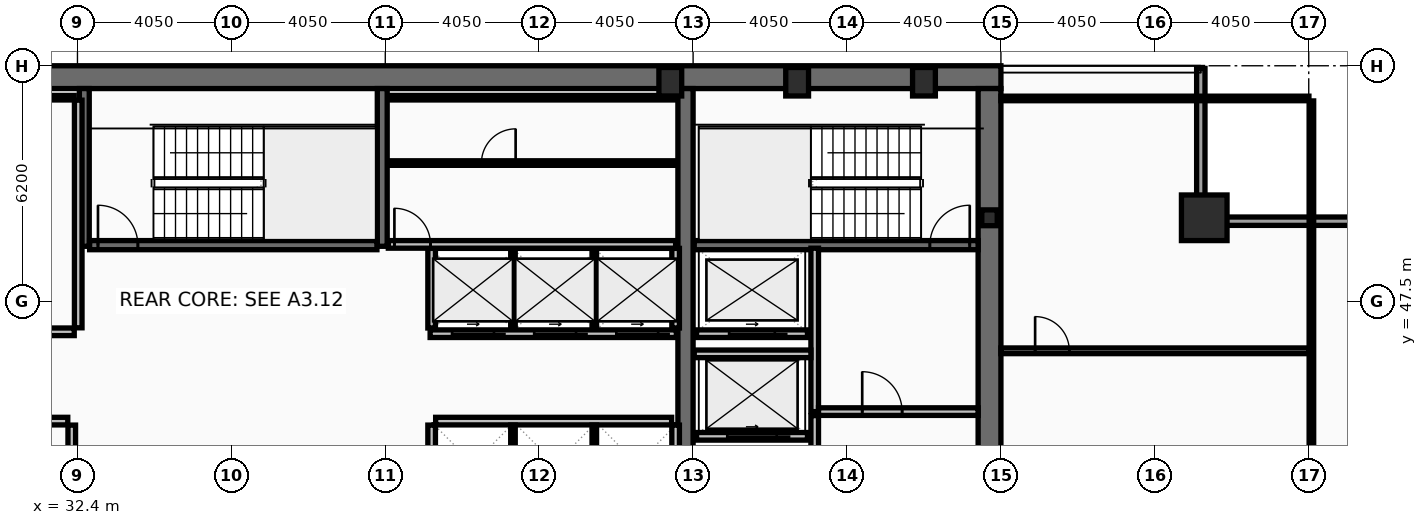
"""IFC4 building model, lengths in metres.
Left out: names, types, materials, properties, quantities, classifications, styles, units other than length and angle.
Written with IfcOpenShell. Run it as: python <this file> out.ifc"""

import sys

from ifc_helpers import new_model, si_unit, direction, frame, frame_2d, origin, origin_2d, place, context, subcontext, project, spatial, rectangle, hollow_rectangle, i_section, extrude, element, fill, save


model = new_model("IFC4")
c1 = context("Model", 3, precision=1e-05, world=origin(), true_north=direction((0.0, 1.0)))
c2 = subcontext(c1, "Body", "Model", "MODEL_VIEW")
j1 = project(units=[si_unit("LENGTHUNIT", "METRE"), si_unit("PLANEANGLEUNIT", "RADIAN")], contexts=[c1])
p1 = place(None, origin())
s1 = spatial("IfcSite", under=j1, at=p1, CompositionType="ELEMENT")
p2 = place(p1, origin())
s2 = spatial("IfcBuilding", under=s1, at=p2, CompositionType="ELEMENT")
p3 = place(p2, frame((0.0, 0.0, 235.4)))
s3 = spatial("IfcBuildingStorey", under=s2, at=p3, CompositionType="ELEMENT", Elevation=235.4)
p4 = place(p3, frame((16.2, 53.4, 0.0), z_axis=(0.0, 0.0, 1.0), x_axis=(1.0, 0.0, 0.0)))
e1 = element("IfcWall", 1, at=p4, inside=s3, PredefinedType="SHEAR", context=c2, shape_type="SweptSolid", body=[
    extrude(rectangle(XDim=40.5, YDim=0.6, at=frame_2d((20.25, 0.0))), origin(), (0.0, 0.0, 1.0), 3.44),
])
p5 = place(p3, frame((56.4, 53.1, 0.0), z_axis=(0.0, 0.0, 1.0), x_axis=(0.0, -1.0, 0.0)))
e2 = element("IfcWall", 2, at=p5, inside=s3, PredefinedType="SHEAR", context=c2, shape_type="SweptSolid", body=[
    extrude(rectangle(XDim=11.2, YDim=0.6, at=frame_2d((5.6, 0.0))), origin(), (0.0, 0.0, 1.0), 3.44),
])
p6 = place(p3, frame((48.4, 41.9, 0.0), z_axis=(0.0, 0.0, 1.0), x_axis=(0.0, 1.0, 0.0)))
e3 = element("IfcWall", 3, at=p6, inside=s3, PredefinedType="SHEAR", context=c2, shape_type="SweptSolid", body=[
    extrude(rectangle(XDim=11.2, YDim=0.4, at=frame_2d((5.6, 0.0))), origin(), (0.0, 0.0, 1.0), 3.44),
])
for number, where, z_axis, x_axis in (
    (4, (32.58, 48.95, 0.0), (0.0, 0.0, 1.0), (0.0, 1.0, 0.0)),
    (5, (40.42, 48.95, 0.0), (0.0, 0.0, 1.0), (0.0, 1.0, 0.0)),
):
    element("IfcWall", number, at=place(p3, frame(where, z_axis=z_axis, x_axis=x_axis)), inside=s3, PredefinedType="SHEAR", context=c2, shape_type="SweptSolid", body=[
        extrude(rectangle(XDim=4.15, YDim=0.26, at=frame_2d((2.075, 0.0))), origin(), (0.0, 0.0, 1.0), 3.44),
    ])
p7 = place(p3, frame((48.63, 48.98, 0.0), z_axis=(0.0, 0.0, 1.0), x_axis=(1.0, 0.0, 0.0)))
e6 = element("IfcWall", 6, at=p7, inside=s3, PredefinedType="SHEAR", context=c2, shape_type="SweptSolid", body=[
    extrude(rectangle(XDim=7.47, YDim=0.24, at=frame_2d((3.735, 0.0))), origin(), (0.0, 0.0, 1.0), 3.44),
])
p8 = place(p7, frame((6.2, 0.0, 0.0)))
e7 = element("IfcOpeningElement", 7, at=p8, cuts=e6, PredefinedType="OPENING", context=c2, shape_type="SweptSolid", body=[
    extrude(rectangle(XDim=1.05, YDim=2.15, at=frame_2d((0.525, 1.075))), frame((0.0, 0.13, 0.0), z_axis=(0.0, -1.0, 0.0), x_axis=(1.0, 0.0, 0.0)), (0.0, 0.0, 1.0), 0.26),
])
p9 = place(p3, frame((32.72, 48.98, 0.0), z_axis=(0.0, 0.0, 1.0), x_axis=(1.0, 0.0, 0.0)))
e8 = element("IfcWall", 8, at=p9, inside=s3, PredefinedType="SHEAR", context=c2, shape_type="SweptSolid", body=[
    extrude(rectangle(XDim=7.56, YDim=0.24, at=frame_2d((3.78, 0.0))), origin(), (0.0, 0.0, 1.0), 3.44),
])
p10 = place(p9, frame((0.22, 0.0, 0.0)))
e9 = element("IfcOpeningElement", 9, at=p10, cuts=e8, PredefinedType="OPENING", context=c2, shape_type="SweptSolid", body=[
    extrude(rectangle(XDim=1.05, YDim=2.15, at=frame_2d((0.525, 1.075))), frame((0.0, 0.13, 0.0), z_axis=(0.0, -1.0, 0.0), x_axis=(1.0, 0.0, 0.0)), (0.0, 0.0, 1.0), 0.26),
])
p11 = place(p3, frame((62.05, 49.7, 0.0), z_axis=(0.0, 0.0, 1.0), x_axis=(1.0, 0.0, 0.0)))
e10 = element("IfcColumn", 10, at=p11, inside=s3, PredefinedType="COLUMN", context=c2, shape_type="SweptSolid", body=[
    extrude(hollow_rectangle(XDim=1.2, YDim=1.2, WallThickness=0.06, at=origin_2d()), origin(), (0.0, 0.0, 1.0), 3.6),
])
for number, where, z_axis, x_axis in (
    (11, (48.0, 53.28, 0.0), (0.0, 0.0, 1.0), (1.0, 0.0, 0.0)),
    (12, (51.337, 53.28, 0.0), (0.0, 0.0, 1.0), (1.0, 0.0, 0.0)),
    (13, (54.675, 53.28, 0.0), (0.0, 0.0, 1.0), (1.0, 0.0, 0.0)),
):
    element("IfcColumn", number, at=place(p3, frame(where, z_axis=z_axis, x_axis=x_axis)), inside=s3, PredefinedType="COLUMN", context=c2, shape_type="SweptSolid", body=[
        extrude(hollow_rectangle(XDim=0.6, YDim=0.75, WallThickness=0.045, at=origin_2d()), origin(), (0.0, 0.0, 1.0), 3.6),
    ])
p12 = place(p3, frame((56.4, 49.7, 0.0), z_axis=(0.0, 0.0, 1.0), x_axis=(1.0, 0.0, 0.0)))
e14 = element("IfcColumn", 14, at=p12, inside=s3, PredefinedType="COLUMN", context=c2, shape_type="SweptSolid", body=[
    extrude(i_section(OverallWidth=0.406, OverallDepth=0.416, WebThickness=0.03, FlangeThickness=0.048, at=origin_2d()), origin(), (0.0, 0.0, 1.0), 3.6),
])
p13 = place(p3, frame((61.96, 53.63, 0.0), z_axis=(0.0, 0.0, 1.0), x_axis=(0.0, -1.0, 0.0)))
e15 = element("IfcWall", 15, at=p13, inside=s3, PredefinedType="SOLIDWALL", context=c2, shape_type="SweptSolid", body=[
    extrude(rectangle(XDim=3.91, YDim=0.22, at=frame_2d((1.955, 0.0))), origin(), (0.0, 0.0, 1.0), 2.09),
])
p14 = place(p3, frame((61.85, 49.61, 0.0), z_axis=(0.0, 0.0, 1.0), x_axis=(1.0, 0.0, 0.0)))
e16 = element("IfcWall", 16, at=p14, inside=s3, PredefinedType="SOLIDWALL", context=c2, shape_type="SweptSolid", body=[
    extrude(rectangle(XDim=4.13, YDim=0.22, at=frame_2d((2.065, 0.0))), origin(), (0.0, 0.0, 1.0), 2.09),
])
p15 = place(p3, frame((51.61, 43.95, 0.0), z_axis=(0.0, 0.0, 1.0), x_axis=(-1.0, 0.0, 0.0)))
e17 = element("IfcWall", 17, at=p15, inside=s3, PredefinedType="PARTITIONING", context=c2, shape_type="SweptSolid", body=[
    extrude(rectangle(XDim=2.92, YDim=0.2, at=frame_2d((1.46, 0.0))), origin(), (0.0, 0.0, 1.0), 3.44),
])
p16 = place(p15, frame((0.81, 0.0, 0.0)))
e18 = element("IfcOpeningElement", 18, at=p16, cuts=e17, PredefinedType="OPENING", context=c2, shape_type="SweptSolid", body=[
    extrude(rectangle(XDim=1.3, YDim=2.18, at=frame_2d((0.65, 1.09))), frame((0.0, 0.11, 0.0), z_axis=(0.0, -1.0, 0.0), x_axis=(1.0, 0.0, 0.0)), (0.0, 0.0, 1.0), 0.22),
])
p17 = place(p3, frame((51.61, 46.65, 0.0), z_axis=(0.0, 0.0, 1.0), x_axis=(-1.0, 0.0, 0.0)))
e19 = element("IfcWall", 19, at=p17, inside=s3, PredefinedType="PARTITIONING", context=c2, shape_type="SweptSolid", body=[
    extrude(rectangle(XDim=2.92, YDim=0.2, at=frame_2d((1.46, 0.0))), origin(), (0.0, 0.0, 1.0), 3.44),
])
p18 = place(p17, frame((0.86, 0.0, 0.0)))
e20 = element("IfcOpeningElement", 20, at=p18, cuts=e19, PredefinedType="OPENING", context=c2, shape_type="SweptSolid", body=[
    extrude(rectangle(XDim=1.2, YDim=2.18, at=frame_2d((0.6, 1.09))), frame((0.0, 0.11, 0.0), z_axis=(0.0, -1.0, 0.0), x_axis=(1.0, 0.0, 0.0)), (0.0, 0.0, 1.0), 0.22),
])
p19 = place(p3, frame((48.16, 46.65, 0.0), z_axis=(0.0, 0.0, 1.0), x_axis=(-1.0, 0.0, 0.0)))
e21 = element("IfcWall", 21, at=p19, inside=s3, PredefinedType="PARTITIONING", context=c2, shape_type="SweptSolid", body=[
    extrude(rectangle(XDim=6.48, YDim=0.2, at=frame_2d((3.24, 0.0))), origin(), (0.0, 0.0, 1.0), 3.44),
])
p20 = place(p19, frame((4.8, 0.0, 0.0)))
e22 = element("IfcOpeningElement", 22, at=p20, cuts=e21, PredefinedType="OPENING", context=c2, shape_type="SweptSolid", body=[
    extrude(rectangle(XDim=1.1, YDim=2.18, at=frame_2d((0.55, 1.09))), frame((0.0, 0.11, 0.0), z_axis=(0.0, -1.0, 0.0), x_axis=(1.0, 0.0, 0.0)), (0.0, 0.0, 1.0), 0.22),
])
p21 = place(p19, frame((2.64, 0.0, 0.0)))
e23 = element("IfcOpeningElement", 23, at=p21, cuts=e21, PredefinedType="OPENING", context=c2, shape_type="SweptSolid", body=[
    extrude(rectangle(XDim=1.1, YDim=2.18, at=frame_2d((0.55, 1.09))), frame((0.0, 0.11, 0.0), z_axis=(0.0, -1.0, 0.0), x_axis=(1.0, 0.0, 0.0)), (0.0, 0.0, 1.0), 0.22),
])
p22 = place(p19, frame((0.48, 0.0, 0.0)))
e24 = element("IfcOpeningElement", 24, at=p22, cuts=e21, PredefinedType="OPENING", context=c2, shape_type="SweptSolid", body=[
    extrude(rectangle(XDim=1.1, YDim=2.18, at=frame_2d((0.55, 1.09))), frame((0.0, 0.11, 0.0), z_axis=(0.0, -1.0, 0.0), x_axis=(1.0, 0.0, 0.0)), (0.0, 0.0, 1.0), 0.22),
])
p23 = place(p3, frame((51.8, 44.6, 0.0), z_axis=(0.0, 0.0, 1.0), x_axis=(0.0, 1.0, 0.0)))
e25 = element("IfcWall", 25, at=p23, inside=s3, PredefinedType="PARTITIONING", context=c2, shape_type="SweptSolid", body=[
    extrude(rectangle(XDim=4.3, YDim=0.2, at=frame_2d((2.15, 0.0))), origin(), (0.0, 0.0, 1.0), 3.44),
])
p24 = place(p3, frame((51.9, 44.6, 0.0), z_axis=(0.0, 0.0, 1.0), x_axis=(1.0, 0.0, 0.0)))
e26 = element("IfcWall", 26, at=p24, inside=s3, PredefinedType="PARTITIONING", context=c2, shape_type="SweptSolid", body=[
    extrude(rectangle(XDim=4.2, YDim=0.2, at=frame_2d((2.1, 0.0))), origin(), (0.0, 0.0, 1.0), 3.44),
])
p25 = place(p24, frame((1.15, 0.0, 0.0)))
e27 = element("IfcOpeningElement", 27, at=p25, cuts=e26, PredefinedType="OPENING", context=c2, shape_type="SweptSolid", body=[
    extrude(rectangle(XDim=1.05, YDim=2.15, at=frame_2d((0.525, 1.075))), frame((0.0, 0.11, 0.0), z_axis=(0.0, -1.0, 0.0), x_axis=(1.0, 0.0, 0.0)), (0.0, 0.0, 1.0), 0.22),
])
p26 = place(p3, frame((48.63, 46.12, 0.0), z_axis=(0.0, 0.0, 1.0), x_axis=(1.0, 0.0, 0.0)))
e28 = element("IfcWall", 28, at=p26, inside=s3, PredefinedType="PARTITIONING", context=c2, shape_type="SweptSolid", body=[
    extrude(rectangle(XDim=3.07, YDim=0.2, at=frame_2d((1.535, 0.0))), origin(), (0.0, 0.0, 1.0), 3.44),
])
p27 = place(p3, frame((51.8, 41.9, 0.0), z_axis=(0.0, 0.0, 1.0), x_axis=(0.0, 1.0, 0.0)))
e29 = element("IfcWall", 29, at=p27, inside=s3, PredefinedType="PARTITIONING", context=c2, shape_type="SweptSolid", body=[
    extrude(rectangle(XDim=2.595, YDim=0.2, at=frame_2d((1.298, 0.0))), origin(), (0.0, 0.0, 1.0), 3.44),
])
p28 = place(p27, frame((0.38, 0.0, 0.0)))
e30 = element("IfcOpeningElement", 30, at=p28, cuts=e29, PredefinedType="OPENING", context=c2, shape_type="SweptSolid", body=[
    extrude(rectangle(XDim=1.05, YDim=2.15, at=frame_2d((0.525, 1.075))), frame((0.0, 0.11, 0.0), z_axis=(0.0, -1.0, 0.0), x_axis=(1.0, 0.0, 0.0)), (0.0, 0.0, 1.0), 0.22),
])
p29 = place(p3, frame((32.42, 46.805, 0.0), z_axis=(0.0, 0.0, 1.0), x_axis=(0.0, 1.0, 0.0)))
e31 = element("IfcWall", 31, at=p29, inside=s3, PredefinedType="PARTITIONING", context=c2, shape_type="SweptSolid", body=[
    extrude(rectangle(XDim=5.99, YDim=0.2, at=frame_2d((2.995, 0.0))), origin(), (0.0, 0.0, 1.0), 3.44),
])
p30 = place(p3, frame((24.805, 52.86, 0.0), z_axis=(0.0, 0.0, 1.0), x_axis=(1.0, 0.0, 0.0)))
e32 = element("IfcWall", 32, at=p30, inside=s3, PredefinedType="PARTITIONING", context=c2, shape_type="SweptSolid", body=[
    extrude(rectangle(XDim=7.51, YDim=0.12, at=frame_2d((3.755, 0.0))), origin(), (0.0, 0.0, 1.0), 3.44),
])
p31 = place(p3, frame((24.805, 46.7, 0.0), z_axis=(0.0, 0.0, 1.0), x_axis=(1.0, 0.0, 0.0)))
e33 = element("IfcWall", 33, at=p31, inside=s3, PredefinedType="PARTITIONING", context=c2, shape_type="SweptSolid", body=[
    extrude(rectangle(XDim=7.51, YDim=0.2, at=frame_2d((3.755, 0.0))), origin(), (0.0, 0.0, 1.0), 3.44),
])
p32 = place(p31, frame((1.15, 0.0, 0.0)))
e34 = element("IfcOpeningElement", 34, at=p32, cuts=e33, PredefinedType="OPENING", context=c2, shape_type="SweptSolid", body=[
    extrude(rectangle(XDim=0.95, YDim=2.1, at=frame_2d((0.475, 1.05))), frame((0.0, 0.11, 0.0), z_axis=(0.0, -1.0, 0.0), x_axis=(1.0, 0.0, 0.0)), (0.0, 0.0, 1.0), 0.22),
])
p33 = place(p31, frame((5.336, 0.0, 0.0)))
e35 = element("IfcOpeningElement", 35, at=p33, cuts=e33, PredefinedType="OPENING", context=c2, shape_type="SweptSolid", body=[
    extrude(rectangle(XDim=0.95, YDim=2.1, at=frame_2d((0.475, 1.05))), frame((0.0, 0.11, 0.0), z_axis=(0.0, -1.0, 0.0), x_axis=(1.0, 0.0, 0.0)), (0.0, 0.0, 1.0), 0.22),
])
p34 = place(p3, frame((32.25, 41.95, 0.0), z_axis=(0.0, 0.0, 1.0), x_axis=(0.0, 1.0, 0.0)))
e36 = element("IfcWall", 36, at=p34, inside=s3, PredefinedType="PARTITIONING", context=c2, shape_type="SweptSolid", body=[
    extrude(rectangle(XDim=2.295, YDim=0.2, at=frame_2d((1.147, 0.0))), origin(), (0.0, 0.0, 1.0), 3.44),
])
p35 = place(p3, frame((24.805, 44.35, 0.0), z_axis=(0.0, 0.0, 1.0), x_axis=(1.0, 0.0, 0.0)))
e37 = element("IfcWall", 37, at=p35, inside=s3, PredefinedType="PARTITIONING", context=c2, shape_type="SweptSolid", body=[
    extrude(rectangle(XDim=7.34, YDim=0.2, at=frame_2d((3.67, 0.0))), origin(), (0.0, 0.0, 1.0), 3.44),
])
p36 = place(p35, frame((1.15, 0.0, 0.0)))
e38 = element("IfcOpeningElement", 38, at=p36, cuts=e37, PredefinedType="OPENING", context=c2, shape_type="SweptSolid", body=[
    extrude(rectangle(XDim=0.95, YDim=2.1, at=frame_2d((0.475, 1.05))), frame((0.0, 0.11, 0.0), z_axis=(0.0, -1.0, 0.0), x_axis=(1.0, 0.0, 0.0)), (0.0, 0.0, 1.0), 0.22),
])
p37 = place(p35, frame((5.231, 0.0, 0.0)))
e39 = element("IfcOpeningElement", 39, at=p37, cuts=e37, PredefinedType="OPENING", context=c2, shape_type="SweptSolid", body=[
    extrude(rectangle(XDim=0.95, YDim=2.1, at=frame_2d((0.475, 1.05))), frame((0.0, 0.11, 0.0), z_axis=(0.0, -1.0, 0.0), x_axis=(1.0, 0.0, 0.0)), (0.0, 0.0, 1.0), 0.22),
])
for number, where, z_axis, x_axis in (
    (40, (41.72, 46.8, 0.0), (0.0, 0.0, 1.0), (0.0, 1.0, 0.0)),
    (41, (48.14, 46.8, 0.0), (0.0, 0.0, 1.0), (0.0, 1.0, 0.0)),
):
    element("IfcWall", number, at=place(p3, frame(where, z_axis=z_axis, x_axis=x_axis)), inside=s3, PredefinedType="PARTITIONING", context=c2, shape_type="SweptSolid", body=[
        extrude(rectangle(XDim=2.095, YDim=0.2, at=frame_2d((1.047, 0.0))), origin(), (0.0, 0.0, 1.0), 3.44),
    ])
for number, where, z_axis, x_axis in (
    (42, (43.86, 46.8, 0.0), (0.0, 0.0, 1.0), (0.0, 1.0, 0.0)),
    (43, (46.0, 46.8, 0.0), (0.0, 0.0, 1.0), (0.0, 1.0, 0.0)),
):
    element("IfcWall", number, at=place(p3, frame(where, z_axis=z_axis, x_axis=x_axis)), inside=s3, PredefinedType="PARTITIONING", context=c2, shape_type="SweptSolid", body=[
        extrude(rectangle(XDim=2.095, YDim=0.12, at=frame_2d((1.047, 0.0))), origin(), (0.0, 0.0, 1.0), 3.44),
    ])
p38 = place(p3, frame((41.825, 44.35, 0.0), z_axis=(0.0, 0.0, 1.0), x_axis=(1.0, 0.0, 0.0)))
e44 = element("IfcWall", 44, at=p38, inside=s3, PredefinedType="PARTITIONING", context=c2, shape_type="SweptSolid", body=[
    extrude(rectangle(XDim=6.21, YDim=0.2, at=frame_2d((3.105, 0.0))), origin(), (0.0, 0.0, 1.0), 3.44),
])
for number, where, z_axis, x_axis in (
    (45, (41.72, 41.95, 0.0), (0.0, 0.0, 1.0), (0.0, 1.0, 0.0)),
    (46, (48.14, 41.95, 0.0), (0.0, 0.0, 1.0), (0.0, 1.0, 0.0)),
):
    element("IfcWall", number, at=place(p3, frame(where, z_axis=z_axis, x_axis=x_axis)), inside=s3, PredefinedType="PARTITIONING", context=c2, shape_type="SweptSolid", body=[
        extrude(rectangle(XDim=2.295, YDim=0.2, at=frame_2d((1.147, 0.0))), origin(), (0.0, 0.0, 1.0), 3.44),
    ])
for number, where, z_axis, x_axis in (
    (47, (43.86, 41.95, 0.0), (0.0, 0.0, 1.0), (0.0, 1.0, 0.0)),
    (48, (46.0, 41.95, 0.0), (0.0, 0.0, 1.0), (0.0, 1.0, 0.0)),
):
    element("IfcWall", number, at=place(p3, frame(where, z_axis=z_axis, x_axis=x_axis)), inside=s3, PredefinedType="PARTITIONING", context=c2, shape_type="SweptSolid", body=[
        extrude(rectangle(XDim=2.295, YDim=0.12, at=frame_2d((1.147, 0.0))), origin(), (0.0, 0.0, 1.0), 3.44),
    ])
p39 = place(p3, frame((40.58, 52.86, 0.0), z_axis=(0.0, 0.0, 1.0), x_axis=(1.0, 0.0, 0.0)))
e49 = element("IfcWall", 49, at=p39, inside=s3, PredefinedType="PARTITIONING", context=c2, shape_type="SweptSolid", body=[
    extrude(rectangle(XDim=7.56, YDim=0.12, at=frame_2d((3.78, 0.0))), origin(), (0.0, 0.0, 1.0), 3.44),
])
p40 = place(p3, frame((40.58, 49.0, 0.0), z_axis=(0.0, 0.0, 1.0), x_axis=(1.0, 0.0, 0.0)))
e50 = element("IfcWall", 50, at=p40, inside=s3, PredefinedType="PARTITIONING", context=c2, shape_type="SweptSolid", body=[
    extrude(rectangle(XDim=7.56, YDim=0.2, at=frame_2d((3.78, 0.0))), origin(), (0.0, 0.0, 1.0), 3.44),
])
p41 = place(p40, frame((0.16, 0.0, 0.0)))
e51 = element("IfcOpeningElement", 51, at=p41, cuts=e50, PredefinedType="OPENING", context=c2, shape_type="SweptSolid", body=[
    extrude(rectangle(XDim=0.95, YDim=2.1, at=frame_2d((0.475, 1.05))), frame((0.0, 0.11, 0.0), z_axis=(0.0, -1.0, 0.0), x_axis=(1.0, 0.0, 0.0)), (0.0, 0.0, 1.0), 0.22),
])
p42 = place(p3, frame((40.63, 51.14, 0.0), z_axis=(0.0, 0.0, 1.0), x_axis=(1.0, 0.0, 0.0)))
e52 = element("IfcWall", 52, at=p42, inside=s3, PredefinedType="PARTITIONING", context=c2, shape_type="SweptSolid", body=[
    extrude(rectangle(XDim=7.46, YDim=0.12, at=frame_2d((3.73, 0.0))), origin(), (0.0, 0.0, 1.0), 3.44),
])
p43 = place(p42, frame((2.4, 0.0, 0.0)))
e53 = element("IfcOpeningElement", 53, at=p43, cuts=e52, PredefinedType="OPENING", context=c2, shape_type="SweptSolid", body=[
    extrude(rectangle(XDim=0.9, YDim=2.05, at=frame_2d((0.45, 1.025))), frame((0.0, 0.07, 0.0), z_axis=(0.0, -1.0, 0.0), x_axis=(1.0, 0.0, 0.0)), (0.0, 0.0, 1.0), 0.14),
])
p44 = place(p3, frame((56.7, 46.2, 0.0), z_axis=(0.0, 0.0, 1.0), x_axis=(1.0, 0.0, 0.0)))
e54 = element("IfcWall", 54, at=p44, inside=s3, PredefinedType="PARTITIONING", context=c2, shape_type="SweptSolid", body=[
    extrude(rectangle(XDim=8.105, YDim=0.15, at=frame_2d((4.052, 0.0))), origin(), (0.0, 0.0, 1.0), 2.83),
])
p45 = place(p44, frame((0.9, 0.0, 0.0)))
e55 = element("IfcOpeningElement", 55, at=p45, cuts=e54, PredefinedType="OPENING", context=c2, shape_type="SweptSolid", body=[
    extrude(rectangle(XDim=0.9, YDim=2.05, at=frame_2d((0.45, 1.025))), frame((0.0, 0.085, 0.0), z_axis=(0.0, -1.0, 0.0), x_axis=(1.0, 0.0, 0.0)), (0.0, 0.0, 1.0), 0.17),
])
p46 = place(p3, frame((64.87, 10.665, 0.0), z_axis=(0.0, 0.0, 1.0), x_axis=(0.0, 1.0, 0.0)))
e56 = element("IfcWall", 56, at=p46, inside=s3, PredefinedType="PARTITIONING", context=c2, shape_type="SweptSolid", body=[
    extrude(rectangle(XDim=42.11, YDim=0.12, at=frame_2d((21.055, 0.0))), origin(), (0.0, 0.0, 1.0), 1.83),
])
p47 = place(p3, frame((56.7, 52.84, 0.0), z_axis=(0.0, 0.0, 1.0), x_axis=(1.0, 0.0, 0.0)))
e57 = element("IfcWall", 57, at=p47, inside=s3, PredefinedType="PARTITIONING", context=c2, shape_type="SweptSolid", body=[
    extrude(rectangle(XDim=8.105, YDim=0.12, at=frame_2d((4.052, 0.0))), origin(), (0.0, 0.0, 1.0), 3.44),
])
p48 = place(p8, origin())
e58 = element("IfcDoor", 58, at=p48, inside=s3, OperationType="SINGLE_SWING_RIGHT", PredefinedType="DOOR", context=c2, shape_type="SweptSolid", body=[
    extrude(rectangle(XDim=1.05, YDim=2.15, at=frame_2d((0.525, 1.075))), frame((0.0, 0.025, 0.0), z_axis=(0.0, -1.0, 0.0), x_axis=(1.0, 0.0, 0.0)), (0.0, 0.0, 1.0), 0.05),
])
fill(e7, e58)
p49 = place(p10, origin())
e59 = element("IfcDoor", 59, at=p49, inside=s3, OperationType="SINGLE_SWING_LEFT", PredefinedType="DOOR", context=c2, shape_type="SweptSolid", body=[
    extrude(rectangle(XDim=1.05, YDim=2.15, at=frame_2d((0.525, 1.075))), frame((0.0, 0.025, 0.0), z_axis=(0.0, -1.0, 0.0), x_axis=(1.0, 0.0, 0.0)), (0.0, 0.0, 1.0), 0.05),
])
fill(e9, e59)
p50 = place(p16, origin())
e60 = element("IfcDoor", 60, at=p50, inside=s3, OperationType="SLIDING_TO_LEFT", PredefinedType="DOOR", context=c2, shape_type="SweptSolid", body=[
    extrude(rectangle(XDim=1.3, YDim=2.18, at=frame_2d((0.65, 1.09))), frame((0.0, 0.025, 0.0), z_axis=(0.0, -1.0, 0.0), x_axis=(1.0, 0.0, 0.0)), (0.0, 0.0, 1.0), 0.05),
])
fill(e18, e60)
p51 = place(p18, origin())
e61 = element("IfcDoor", 61, at=p51, inside=s3, OperationType="SLIDING_TO_LEFT", PredefinedType="DOOR", context=c2, shape_type="SweptSolid", body=[
    extrude(rectangle(XDim=1.2, YDim=2.18, at=frame_2d((0.6, 1.09))), frame((0.0, 0.025, 0.0), z_axis=(0.0, -1.0, 0.0), x_axis=(1.0, 0.0, 0.0)), (0.0, 0.0, 1.0), 0.05),
])
fill(e20, e61)
p52 = place(p20, origin())
e62 = element("IfcDoor", 62, at=p52, inside=s3, OperationType="SLIDING_TO_LEFT", PredefinedType="DOOR", context=c2, shape_type="SweptSolid", body=[
    extrude(rectangle(XDim=1.1, YDim=2.18, at=frame_2d((0.55, 1.09))), frame((0.0, 0.025, 0.0), z_axis=(0.0, -1.0, 0.0), x_axis=(1.0, 0.0, 0.0)), (0.0, 0.0, 1.0), 0.05),
])
fill(e22, e62)
p53 = place(p21, origin())
e63 = element("IfcDoor", 63, at=p53, inside=s3, OperationType="SLIDING_TO_LEFT", PredefinedType="DOOR", context=c2, shape_type="SweptSolid", body=[
    extrude(rectangle(XDim=1.1, YDim=2.18, at=frame_2d((0.55, 1.09))), frame((0.0, 0.025, 0.0), z_axis=(0.0, -1.0, 0.0), x_axis=(1.0, 0.0, 0.0)), (0.0, 0.0, 1.0), 0.05),
])
fill(e23, e63)
p54 = place(p22, origin())
e64 = element("IfcDoor", 64, at=p54, inside=s3, OperationType="SLIDING_TO_LEFT", PredefinedType="DOOR", context=c2, shape_type="SweptSolid", body=[
    extrude(rectangle(XDim=1.1, YDim=2.18, at=frame_2d((0.55, 1.09))), frame((0.0, 0.025, 0.0), z_axis=(0.0, -1.0, 0.0), x_axis=(1.0, 0.0, 0.0)), (0.0, 0.0, 1.0), 0.05),
])
fill(e24, e64)
p55 = place(p25, origin())
e65 = element("IfcDoor", 65, at=p55, inside=s3, OperationType="SINGLE_SWING_LEFT", PredefinedType="DOOR", context=c2, shape_type="SweptSolid", body=[
    extrude(rectangle(XDim=1.05, YDim=2.15, at=frame_2d((0.525, 1.075))), frame((0.0, 0.025, 0.0), z_axis=(0.0, -1.0, 0.0), x_axis=(1.0, 0.0, 0.0)), (0.0, 0.0, 1.0), 0.05),
])
fill(e27, e65)
p56 = place(p41, origin())
e66 = element("IfcDoor", 66, at=p56, inside=s3, OperationType="SINGLE_SWING_LEFT", PredefinedType="DOOR", context=c2, shape_type="SweptSolid", body=[
    extrude(rectangle(XDim=0.95, YDim=2.1, at=frame_2d((0.475, 1.05))), frame((0.0, 0.025, 0.0), z_axis=(0.0, -1.0, 0.0), x_axis=(1.0, 0.0, 0.0)), (0.0, 0.0, 1.0), 0.05),
])
fill(e51, e66)
p57 = place(p43, origin())
e67 = element("IfcDoor", 67, at=p57, inside=s3, OperationType="SINGLE_SWING_RIGHT", PredefinedType="DOOR", context=c2, shape_type="SweptSolid", body=[
    extrude(rectangle(XDim=0.9, YDim=2.05, at=frame_2d((0.45, 1.025))), frame((0.0, 0.025, 0.0), z_axis=(0.0, -1.0, 0.0), x_axis=(1.0, 0.0, 0.0)), (0.0, 0.0, 1.0), 0.05),
])
fill(e53, e67)
p58 = place(p45, origin())
e68 = element("IfcDoor", 68, at=p58, inside=s3, OperationType="SINGLE_SWING_LEFT", PredefinedType="DOOR", context=c2, shape_type="SweptSolid", body=[
    extrude(rectangle(XDim=0.9, YDim=2.05, at=frame_2d((0.45, 1.025))), frame((0.0, 0.025, 0.0), z_axis=(0.0, -1.0, 0.0), x_axis=(1.0, 0.0, 0.0)), (0.0, 0.0, 1.0), 0.05),
])
fill(e55, e68)
save(model, sys.argv[1])
